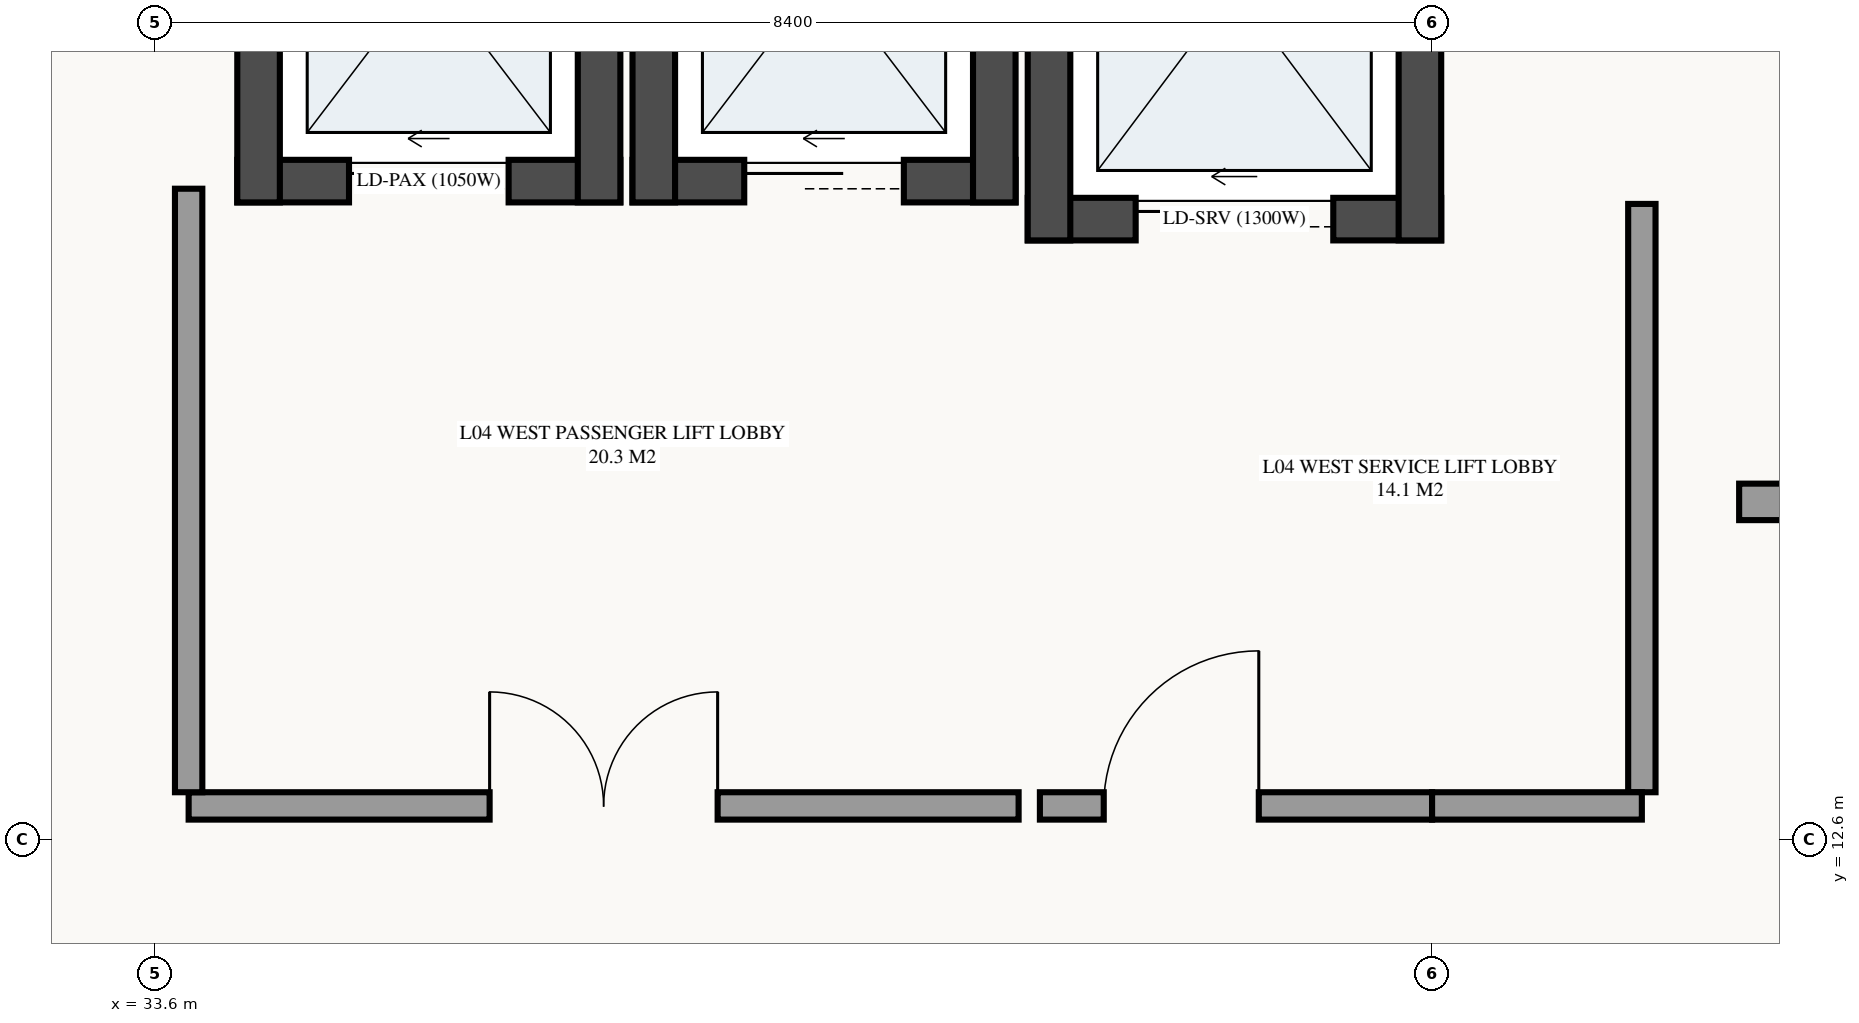
"""IFC4 building model, lengths in metres.
Left out: names, types, materials, properties, quantities, classifications, styles, units other than length and angle.
Written with IfcOpenShell. Run it as: python <this file> out.ifc"""

import sys

from ifc_helpers import new_model, si_unit, direction, frame, frame_2d, origin, origin_2d, place, context, subcontext, project, spatial, rectangle, extrude, element, fill, save


model = new_model("IFC4")
c1 = context("Model", 3, precision=1e-05, world=origin(), true_north=direction((0.0, 1.0)))
c2 = subcontext(c1, "Body", "Model", "MODEL_VIEW")
j1 = project(units=[si_unit("LENGTHUNIT", "METRE"), si_unit("PLANEANGLEUNIT", "RADIAN")], contexts=[c1])
p1 = place(None, origin())
s1 = spatial("IfcSite", under=j1, at=p1, CompositionType="ELEMENT")
p2 = place(p1, origin())
s2 = spatial("IfcBuilding", under=s1, at=p2, CompositionType="ELEMENT")
p3 = place(p2, frame((0.0, 0.0, 18.3)))
s3 = spatial("IfcBuildingStorey", under=s2, at=p3, CompositionType="ELEMENT", Elevation=18.3)
for number, where, z_axis, x_axis in (
    (1, (33.6, 12.6, 0.0), (0.0, 0.0, 1.0), (1.0, 0.0, 0.0)),
    (2, (42.0, 12.6, 0.0), (0.0, 0.0, 1.0), (1.0, 0.0, 0.0)),
):
    element("IfcColumn", number, at=place(p3, frame(where, z_axis=z_axis, x_axis=x_axis)), inside=s3, PredefinedType="COLUMN", context=c2, shape_type="SweptSolid", body=[
        extrude(rectangle(XDim=0.65, YDim=0.65, at=origin_2d()), origin(), (0.0, 0.0, 1.0), 3.6),
    ])
p4 = place(p3, frame((34.14, 16.93, 0.0), z_axis=(0.0, 0.0, 1.0), x_axis=(1.0, 0.0, 0.0)))
e3 = element("IfcWall", 3, at=p4, inside=s3, PredefinedType="SHEAR", context=c2, shape_type="SweptSolid", body=[
    extrude(rectangle(XDim=2.52, YDim=0.28, at=frame_2d((1.26, 0.0))), origin(), (0.0, 0.0, 1.0), 3.6),
])
p5 = place(p4, frame((0.735, 0.0, 0.0)))
e4 = element("IfcOpeningElement", 4, at=p5, cuts=e3, PredefinedType="OPENING", context=c2, shape_type="SweptSolid", body=[
    extrude(rectangle(XDim=1.05, YDim=2.2, at=frame_2d((0.525, 1.1))), frame((0.0, 0.15, 0.0), z_axis=(0.0, -1.0, 0.0), x_axis=(1.0, 0.0, 0.0)), (0.0, 0.0, 1.0), 0.3),
])
for number, where, z_axis, x_axis in (
    (5, (36.52, 16.79, 0.0), (0.0, 0.0, 1.0), (0.0, 1.0, 0.0)),
    (6, (34.28, 19.81, 0.0), (0.0, 0.0, 1.0), (0.0, -1.0, 0.0)),
):
    element("IfcWall", number, at=place(p3, frame(where, z_axis=z_axis, x_axis=x_axis)), inside=s3, PredefinedType="SHEAR", context=c2, shape_type="SweptSolid", body=[
        extrude(rectangle(XDim=3.02, YDim=0.28, at=frame_2d((1.51, 0.0))), origin(), (0.0, 0.0, 1.0), 3.6),
    ])
p6 = place(p3, frame((36.74, 16.93, 0.0), z_axis=(0.0, 0.0, 1.0), x_axis=(1.0, 0.0, 0.0)))
e7 = element("IfcWall", 7, at=p6, inside=s3, PredefinedType="SHEAR", context=c2, shape_type="SweptSolid", body=[
    extrude(rectangle(XDim=2.52, YDim=0.28, at=frame_2d((1.26, 0.0))), origin(), (0.0, 0.0, 1.0), 3.6),
])
p7 = place(p6, frame((0.735, 0.0, 0.0)))
e8 = element("IfcOpeningElement", 8, at=p7, cuts=e7, PredefinedType="OPENING", context=c2, shape_type="SweptSolid", body=[
    extrude(rectangle(XDim=1.05, YDim=2.2, at=frame_2d((0.525, 1.1))), frame((0.0, 0.15, 0.0), z_axis=(0.0, -1.0, 0.0), x_axis=(1.0, 0.0, 0.0)), (0.0, 0.0, 1.0), 0.3),
])
for number, where, z_axis, x_axis in (
    (9, (39.12, 16.79, 0.0), (0.0, 0.0, 1.0), (0.0, 1.0, 0.0)),
    (10, (36.88, 19.81, 0.0), (0.0, 0.0, 1.0), (0.0, -1.0, 0.0)),
):
    element("IfcWall", number, at=place(p3, frame(where, z_axis=z_axis, x_axis=x_axis)), inside=s3, PredefinedType="SHEAR", context=c2, shape_type="SweptSolid", body=[
        extrude(rectangle(XDim=3.02, YDim=0.28, at=frame_2d((1.51, 0.0))), origin(), (0.0, 0.0, 1.0), 3.6),
    ])
p8 = place(p3, frame((39.34, 16.68, 0.0), z_axis=(0.0, 0.0, 1.0), x_axis=(1.0, 0.0, 0.0)))
e11 = element("IfcWall", 11, at=p8, inside=s3, PredefinedType="SHEAR", context=c2, shape_type="SweptSolid", body=[
    extrude(rectangle(XDim=2.72, YDim=0.28, at=frame_2d((1.36, 0.0))), origin(), (0.0, 0.0, 1.0), 3.6),
])
p9 = place(p8, frame((0.71, 0.0, 0.0)))
e12 = element("IfcOpeningElement", 12, at=p9, cuts=e11, PredefinedType="OPENING", context=c2, shape_type="SweptSolid", body=[
    extrude(rectangle(XDim=1.3, YDim=2.25, at=frame_2d((0.65, 1.125))), frame((0.0, 0.15, 0.0), z_axis=(0.0, -1.0, 0.0), x_axis=(1.0, 0.0, 0.0)), (0.0, 0.0, 1.0), 0.3),
])
for number, where, z_axis, x_axis in (
    (13, (41.92, 16.54, 0.0), (0.0, 0.0, 1.0), (0.0, 1.0, 0.0)),
    (14, (39.48, 19.86, 0.0), (0.0, 0.0, 1.0), (0.0, -1.0, 0.0)),
):
    element("IfcWall", number, at=place(p3, frame(where, z_axis=z_axis, x_axis=x_axis)), inside=s3, PredefinedType="SHEAR", context=c2, shape_type="SweptSolid", body=[
        extrude(rectangle(XDim=3.32, YDim=0.28, at=frame_2d((1.66, 0.0))), origin(), (0.0, 0.0, 1.0), 3.6),
    ])
p10 = place(p3, frame((33.82, 12.82, 0.0), z_axis=(0.0, 0.0, 1.0), x_axis=(1.0, 0.0, 0.0)))
e15 = element("IfcWall", 15, at=p10, inside=s3, PredefinedType="PARTITIONING", context=c2, shape_type="SweptSolid", body=[
    extrude(rectangle(XDim=5.46, YDim=0.18, at=frame_2d((2.73, 0.0))), origin(), (0.0, 0.0, 1.0), 2.53),
])
p11 = place(p10, frame((1.98, 0.0, 0.0)))
e16 = element("IfcOpeningElement", 16, at=p11, cuts=e15, PredefinedType="OPENING", context=c2, shape_type="SweptSolid", body=[
    extrude(rectangle(XDim=1.5, YDim=2.15, at=frame_2d((0.75, 1.075))), frame((0.0, 0.1, 0.0), z_axis=(0.0, -1.0, 0.0), x_axis=(1.0, 0.0, 0.0)), (0.0, 0.0, 1.0), 0.2),
])
p12 = place(p3, frame((33.82, 12.91, 0.0), z_axis=(0.0, 0.0, 1.0), x_axis=(0.0, 1.0, 0.0)))
e17 = element("IfcWall", 17, at=p12, inside=s3, PredefinedType="PARTITIONING", context=c2, shape_type="SweptSolid", body=[
    extrude(rectangle(XDim=3.97, YDim=0.18, at=frame_2d((1.985, 0.0))), origin(), (0.0, 0.0, 1.0), 2.73),
])
p13 = place(p3, frame((39.42, 12.82, 0.0), z_axis=(0.0, 0.0, 1.0), x_axis=(1.0, 0.0, 0.0)))
e18 = element("IfcWall", 18, at=p13, inside=s3, PredefinedType="PARTITIONING", context=c2, shape_type="SweptSolid", body=[
    extrude(rectangle(XDim=2.58, YDim=0.18, at=frame_2d((1.29, 0.0))), origin(), (0.0, 0.0, 1.0), 2.53),
])
p14 = place(p13, frame((0.42, 0.0, 0.0)))
e19 = element("IfcOpeningElement", 19, at=p14, cuts=e18, PredefinedType="OPENING", context=c2, shape_type="SweptSolid", body=[
    extrude(rectangle(XDim=1.02, YDim=2.15, at=frame_2d((0.51, 1.075))), frame((0.0, 0.1, 0.0), z_axis=(0.0, -1.0, 0.0), x_axis=(1.0, 0.0, 0.0)), (0.0, 0.0, 1.0), 0.2),
])
p15 = place(p3, frame((43.38, 12.91, 0.0), z_axis=(0.0, 0.0, 1.0), x_axis=(0.0, 1.0, 0.0)))
e20 = element("IfcWall", 20, at=p15, inside=s3, PredefinedType="PARTITIONING", context=c2, shape_type="SweptSolid", body=[
    extrude(rectangle(XDim=3.87, YDim=0.18, at=frame_2d((1.935, 0.0))), origin(), (0.0, 0.0, 1.0), 3.375),
])
p16 = place(p3, frame((44.02, 14.82, 0.0), z_axis=(0.0, 0.0, 1.0), x_axis=(1.0, 0.0, 0.0)))
e21 = element("IfcWall", 21, at=p16, inside=s3, PredefinedType="PARTITIONING", context=c2, shape_type="SweptSolid", body=[
    extrude(rectangle(XDim=5.96, YDim=0.24, at=frame_2d((2.98, 0.0))), origin(), (0.0, 0.0, 1.0), 3.375),
])
p17 = place(p16, frame((2.13, 0.0, 0.0)))
e22 = element("IfcOpeningElement", 22, at=p17, cuts=e21, PredefinedType="OPENING", context=c2, shape_type="SweptSolid", body=[
    extrude(rectangle(XDim=1.7, YDim=2.2, at=frame_2d((0.85, 1.1))), frame((0.0, 0.13, 0.0), z_axis=(0.0, -1.0, 0.0), x_axis=(1.0, 0.0, 0.0)), (0.0, 0.0, 1.0), 0.26),
])
p18 = place(p3, frame((42.0, 12.82, 0.0), z_axis=(0.0, 0.0, 1.0), x_axis=(1.0, 0.0, 0.0)))
e23 = element("IfcWall", 23, at=p18, inside=s3, PredefinedType="PARTITIONING", context=c2, shape_type="SweptSolid", body=[
    extrude(rectangle(XDim=1.38, YDim=0.18, at=frame_2d((0.69, 0.0))), origin(), (0.0, 0.0, 1.0), 2.63),
])
p19 = place(p5, origin())
e24 = element("IfcDoor", 24, at=p19, inside=s3, OperationType="SLIDING_TO_LEFT", PredefinedType="DOOR", context=c2, shape_type="SweptSolid", body=[
    extrude(rectangle(XDim=1.05, YDim=2.2, at=frame_2d((0.525, 1.1))), frame((0.0, 0.025, 0.0), z_axis=(0.0, -1.0, 0.0), x_axis=(1.0, 0.0, 0.0)), (0.0, 0.0, 1.0), 0.05),
])
fill(e4, e24)
p20 = place(p7, origin())
e25 = element("IfcDoor", 25, at=p20, inside=s3, OperationType="SLIDING_TO_LEFT", PredefinedType="DOOR", context=c2, shape_type="SweptSolid", body=[
    extrude(rectangle(XDim=1.05, YDim=2.2, at=frame_2d((0.525, 1.1))), frame((0.0, 0.025, 0.0), z_axis=(0.0, -1.0, 0.0), x_axis=(1.0, 0.0, 0.0)), (0.0, 0.0, 1.0), 0.05),
])
fill(e8, e25)
p21 = place(p9, origin())
e26 = element("IfcDoor", 26, at=p21, inside=s3, OperationType="SLIDING_TO_LEFT", PredefinedType="DOOR", context=c2, shape_type="SweptSolid", body=[
    extrude(rectangle(XDim=1.3, YDim=2.25, at=frame_2d((0.65, 1.125))), frame((0.0, 0.025, 0.0), z_axis=(0.0, -1.0, 0.0), x_axis=(1.0, 0.0, 0.0)), (0.0, 0.0, 1.0), 0.05),
])
fill(e12, e26)
p22 = place(p11, origin())
e27 = element("IfcDoor", 27, at=p22, inside=s3, OperationType="DOUBLE_DOOR_SINGLE_SWING", PredefinedType="DOOR", context=c2, shape_type="SweptSolid", body=[
    extrude(rectangle(XDim=1.5, YDim=2.15, at=frame_2d((0.75, 1.075))), frame((0.0, 0.025, 0.0), z_axis=(0.0, -1.0, 0.0), x_axis=(1.0, 0.0, 0.0)), (0.0, 0.0, 1.0), 0.05),
])
fill(e16, e27)
p23 = place(p14, origin())
e28 = element("IfcDoor", 28, at=p23, inside=s3, OperationType="SINGLE_SWING_RIGHT", PredefinedType="DOOR", context=c2, shape_type="SweptSolid", body=[
    extrude(rectangle(XDim=1.02, YDim=2.15, at=frame_2d((0.51, 1.075))), frame((0.0, 0.025, 0.0), z_axis=(0.0, -1.0, 0.0), x_axis=(1.0, 0.0, 0.0)), (0.0, 0.0, 1.0), 0.05),
])
fill(e19, e28)
save(model, sys.argv[1])
